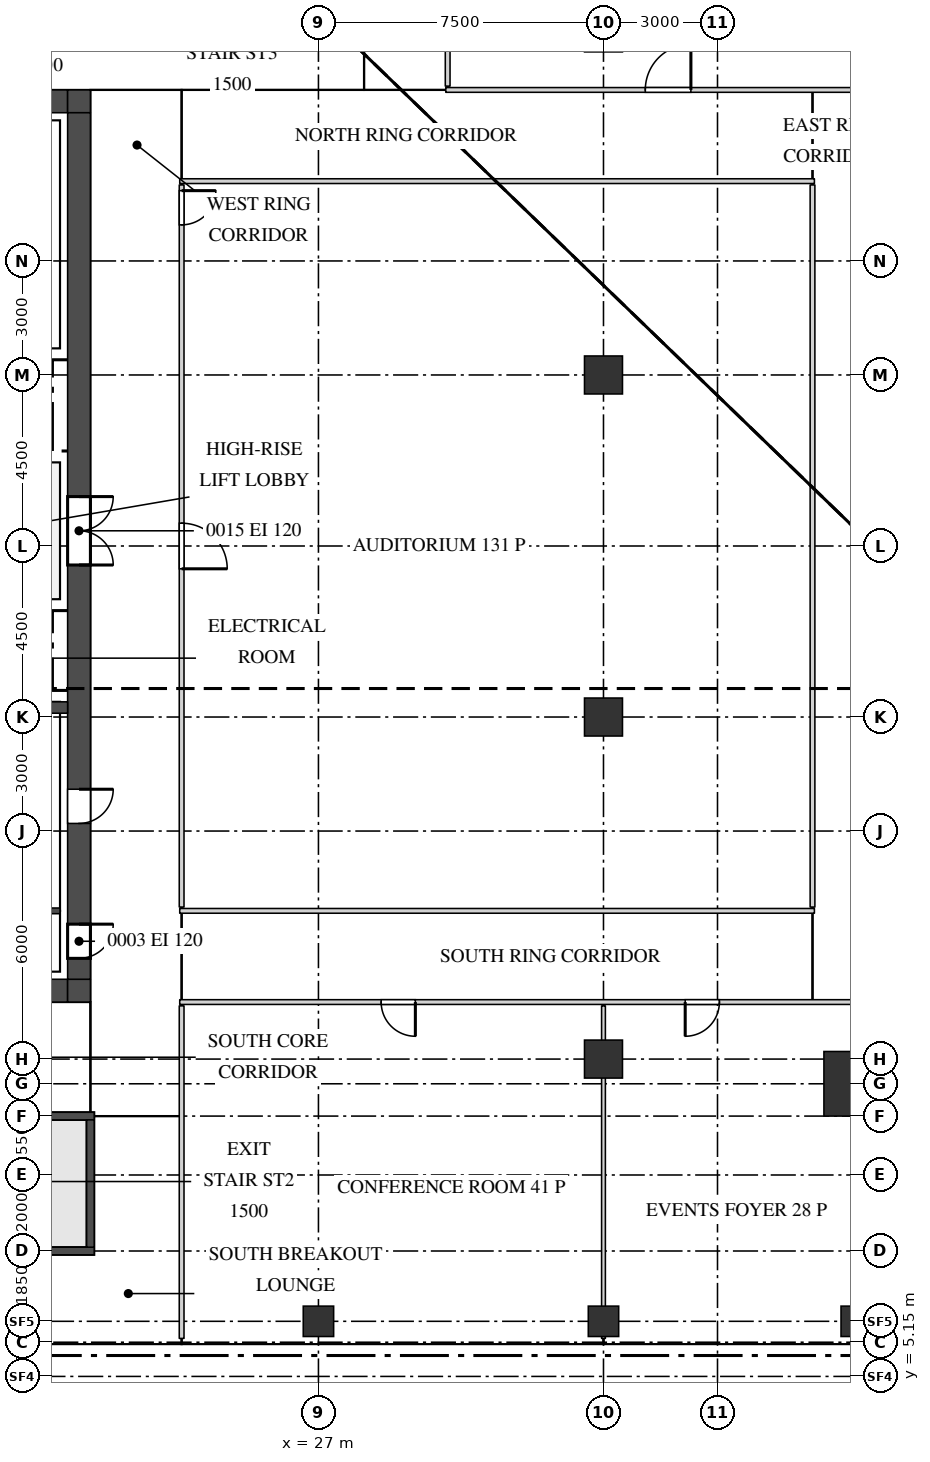
"""IFC4 building model, lengths in metres.
Left out: names, types, materials, properties, quantities, classifications, styles, units other than length and angle.
Written with IfcOpenShell. Run it as: python <this file> out.ifc"""

import sys

from ifc_helpers import new_model, si_unit, direction, frame, frame_2d, origin, origin_2d, place, context, subcontext, project, spatial, rectangle, extrude, source, transform, mapped, element, fill, save


model = new_model("IFC4")
c1 = context("Model", 3, precision=1e-05, world=origin(), true_north=direction((0.0, 1.0)))
c2 = subcontext(c1, "Body", "Model", "MODEL_VIEW")
j1 = project(units=[si_unit("LENGTHUNIT", "METRE"), si_unit("PLANEANGLEUNIT", "RADIAN")], contexts=[c1])
p1 = place(None, origin())
s1 = spatial("IfcSite", under=j1, at=p1, CompositionType="ELEMENT")
p2 = place(p1, origin())
s2 = spatial("IfcBuilding", under=s1, at=p2, CompositionType="ELEMENT")
p3 = place(p2, frame((0.0, 0.0, 318.2)))
s3 = spatial("IfcBuildingStorey", under=s2, at=p3, CompositionType="ELEMENT", Elevation=318.2)
m1 = source(origin(), c2, "Body", "SweptSolid", [
    extrude(rectangle(XDim=14.4, YDim=0.6, at=frame_2d((7.2, 0.0))), origin(), (0.0, 0.0, 1.0), 3.75),
])
p4 = place(p3, frame((6.0, 38.7, 0.0), z_axis=(0.0, 0.0, 1.0), x_axis=(1.0, 0.0, 0.0)))
e1 = element("IfcWall", 1, at=p4, inside=s3, PredefinedType="SHEAR", context=c2, shape_type="MappedRepresentation", body=[
    mapped(m1, transform((0.0, 0.0, 0.0))),
])
m2 = source(origin(), c2, "Body", "SweptSolid", [
    extrude(rectangle(XDim=0.9, YDim=2.1, at=frame_2d((0.45, 1.05))), frame((0.0, 0.31, 0.0), z_axis=(0.0, -1.0, 0.0), x_axis=(1.0, 0.0, 0.0)), (0.0, 0.0, 1.0), 0.62),
])
p5 = place(p4, frame((2.05, 0.0, 0.0)))
e2 = element("IfcOpeningElement", 2, at=p5, cuts=e1, PredefinedType="OPENING", context=c2, shape_type="MappedRepresentation", body=[
    mapped(m2, transform((0.0, 0.0, 0.0))),
])
p6 = place(p4, frame((5.45, 0.0, 0.0)))
e3 = element("IfcOpeningElement", 3, at=p6, cuts=e1, PredefinedType="OPENING", context=c2, shape_type="MappedRepresentation", body=[
    mapped(m2, transform((0.0, 0.0, 0.0))),
])
m3 = source(origin(), c2, "Body", "SweptSolid", [
    extrude(rectangle(XDim=1.0, YDim=2.1, at=frame_2d((0.5, 1.05))), frame((0.0, 0.31, 0.0), z_axis=(0.0, -1.0, 0.0), x_axis=(1.0, 0.0, 0.0)), (0.0, 0.0, 1.0), 0.62),
])
p7 = place(p4, frame((8.8, 0.0, 0.0)))
e4 = element("IfcOpeningElement", 4, at=p7, cuts=e1, PredefinedType="OPENING", context=c2, shape_type="MappedRepresentation", body=[
    mapped(m3, transform((0.0, 0.0, 0.0))),
])
p8 = place(p4, frame((12.15, 0.0, 0.0)))
e5 = element("IfcOpeningElement", 5, at=p8, cuts=e1, PredefinedType="OPENING", context=c2, shape_type="MappedRepresentation", body=[
    mapped(m2, transform((0.0, 0.0, 0.0))),
])
m4 = source(origin(), c2, "Body", "SweptSolid", [
    extrude(rectangle(XDim=0.6, YDim=0.6, at=frame_2d((0.3, 0.0))), origin(), (0.0, 0.0, 1.0), 3.75),
])
p9 = place(p3, frame((20.4, 38.7, 0.0), z_axis=(0.0, 0.0, 1.0), x_axis=(1.0, 0.0, 0.0)))
e6 = element("IfcWall", 6, at=p9, inside=s3, PredefinedType="SHEAR", context=c2, shape_type="MappedRepresentation", body=[
    mapped(m4, transform((0.0, 0.0, 0.0))),
])
p10 = place(p3, frame((6.0, 15.3, 0.0), z_axis=(0.0, 0.0, 1.0), x_axis=(1.0, 0.0, 0.0)))
e7 = element("IfcWall", 7, at=p10, inside=s3, PredefinedType="SHEAR", context=c2, shape_type="MappedRepresentation", body=[
    mapped(m1, transform((0.0, 0.0, 0.0))),
])
m5 = source(origin(), c2, "Body", "SweptSolid", [
    extrude(rectangle(XDim=1.2, YDim=2.1, at=frame_2d((0.6, 1.05))), frame((0.0, 0.31, 0.0), z_axis=(0.0, -1.0, 0.0), x_axis=(1.0, 0.0, 0.0)), (0.0, 0.0, 1.0), 0.62),
])
p11 = place(p10, frame((6.2, 0.0, 0.0)))
e8 = element("IfcOpeningElement", 8, at=p11, cuts=e7, PredefinedType="OPENING", context=c2, shape_type="MappedRepresentation", body=[
    mapped(m5, transform((0.0, 0.0, 0.0))),
])
p12 = place(p10, frame((2.85, 0.0, 0.0)))
e9 = element("IfcOpeningElement", 9, at=p12, cuts=e7, PredefinedType="OPENING", context=c2, shape_type="MappedRepresentation", body=[
    mapped(m5, transform((0.0, 0.0, 0.0))),
])
p13 = place(p10, frame((8.7, 0.0, 0.0)))
e10 = element("IfcOpeningElement", 10, at=p13, cuts=e7, PredefinedType="OPENING", context=c2, shape_type="MappedRepresentation", body=[
    mapped(m3, transform((0.0, 0.0, 0.0))),
])
p14 = place(p3, frame((20.4, 15.3, 0.0), z_axis=(0.0, 0.0, 1.0), x_axis=(1.0, 0.0, 0.0)))
e11 = element("IfcWall", 11, at=p14, inside=s3, PredefinedType="SHEAR", context=c2, shape_type="MappedRepresentation", body=[
    mapped(m4, transform((0.0, 0.0, 0.0))),
])
m6 = source(origin(), c2, "Body", "SweptSolid", [
    extrude(rectangle(XDim=22.8, YDim=0.6, at=frame_2d((11.4, 0.0))), origin(), (0.0, 0.0, 1.0), 3.75),
])
p15 = place(p3, frame((20.7, 15.6, 0.0), z_axis=(0.0, 0.0, 1.0), x_axis=(0.0, 1.0, 0.0)))
e12 = element("IfcWall", 12, at=p15, inside=s3, PredefinedType="SHEAR", context=c2, shape_type="MappedRepresentation", body=[
    mapped(m6, transform((0.0, 0.0, 0.0))),
])
m7 = source(origin(), c2, "Body", "SweptSolid", [
    extrude(rectangle(XDim=1.8, YDim=2.1, at=frame_2d((0.9, 1.05))), frame((0.0, 0.31, 0.0), z_axis=(0.0, -1.0, 0.0), x_axis=(1.0, 0.0, 0.0)), (0.0, 0.0, 1.0), 0.62),
])
p16 = place(p15, frame((10.9, 0.0, 0.0)))
e13 = element("IfcOpeningElement", 13, at=p16, cuts=e12, PredefinedType="OPENING", context=c2, shape_type="MappedRepresentation", body=[
    mapped(m7, transform((0.0, 0.0, 0.0))),
])
p17 = place(p15, frame((0.55, 0.0, 0.0)))
e14 = element("IfcOpeningElement", 14, at=p17, cuts=e12, PredefinedType="OPENING", context=c2, shape_type="MappedRepresentation", body=[
    mapped(m2, transform((0.0, 0.0, 0.0))),
])
p18 = place(p15, frame((4.1, 0.0, 0.0)))
e15 = element("IfcOpeningElement", 15, at=p18, cuts=e12, PredefinedType="OPENING", context=c2, shape_type="MappedRepresentation", body=[
    mapped(m2, transform((0.0, 0.0, 0.0))),
])
m8 = source(origin(), c2, "Body", "SweptSolid", [
    extrude(rectangle(XDim=7.2, YDim=0.2, at=frame_2d((3.6, 0.0))), origin(), (0.0, 0.0, 1.0), 3.75),
])
p19 = place(p3, frame((13.9, 12.0, 0.0), z_axis=(0.0, 0.0, 1.0), x_axis=(1.0, 0.0, 0.0)))
e16 = element("IfcWall", 16, at=p19, inside=s3, PredefinedType="SHEAR", context=c2, shape_type="MappedRepresentation", body=[
    mapped(m8, transform((0.0, 0.0, 0.0))),
])
p20 = place(p3, frame((13.9, 8.45, 0.0), z_axis=(0.0, 0.0, 1.0), x_axis=(1.0, 0.0, 0.0)))
e17 = element("IfcWall", 17, at=p20, inside=s3, PredefinedType="SHEAR", context=c2, shape_type="MappedRepresentation", body=[
    mapped(m8, transform((0.0, 0.0, 0.0))),
])
m9 = source(origin(), c2, "Body", "SweptSolid", [
    extrude(rectangle(XDim=1.2, YDim=2.1, at=frame_2d((0.6, 1.05))), frame((0.0, 0.11, 0.0), z_axis=(0.0, -1.0, 0.0), x_axis=(1.0, 0.0, 0.0)), (0.0, 0.0, 1.0), 0.22),
])
p21 = place(p20, frame((0.35, 0.0, 0.0)))
e18 = element("IfcOpeningElement", 18, at=p21, cuts=e17, PredefinedType="OPENING", context=c2, shape_type="MappedRepresentation", body=[
    mapped(m9, transform((0.0, 0.0, 0.0))),
])
m10 = source(origin(), c2, "Body", "SweptSolid", [
    extrude(rectangle(XDim=3.35, YDim=0.2, at=frame_2d((1.675, 0.0))), origin(), (0.0, 0.0, 1.0), 3.75),
])
p22 = place(p3, frame((21.0, 8.55, 0.0), z_axis=(0.0, 0.0, 1.0), x_axis=(0.0, 1.0, 0.0)))
e19 = element("IfcWall", 19, at=p22, inside=s3, PredefinedType="SHEAR", context=c2, shape_type="MappedRepresentation", body=[
    mapped(m10, transform((0.0, 0.0, 0.0))),
])
m11 = source(origin(), c2, "Body", "SweptSolid", [
    extrude(rectangle(XDim=13.2, YDim=0.3, at=frame_2d((6.6, 0.0))), origin(), (0.0, 0.0, 1.0), 3.75),
])
p23 = place(p3, frame((7.2, 22.75, 0.0), z_axis=(0.0, 0.0, 1.0), x_axis=(1.0, 0.0, 0.0)))
e20 = element("IfcWall", 20, at=p23, inside=s3, PredefinedType="STANDARD", context=c2, shape_type="MappedRepresentation", body=[
    mapped(m11, transform((0.0, 0.0, 0.0))),
])
m12 = source(origin(), c2, "Body", "SweptSolid", [
    extrude(rectangle(XDim=1.7, YDim=1.7, at=origin_2d()), origin(), (0.0, 0.0, 1.0), 3.75),
])
p24 = place(p3, frame((41.15, 12.85, 0.0), z_axis=(0.0, 0.0, 1.0), x_axis=(1.0, 0.0, 0.0)))
e21 = element("IfcColumn", 21, at=p24, inside=s3, PredefinedType="COLUMN", context=c2, shape_type="MappedRepresentation", body=[
    mapped(m12, transform((0.0, 0.0, 0.0))),
])
m13 = source(origin(), c2, "Body", "SweptSolid", [
    extrude(rectangle(XDim=0.8, YDim=0.8, at=origin_2d()), origin(), (0.0, 0.0, 1.0), 3.75),
])
for number, where, z_axis, x_axis in (
    (22, (27.0, 6.6, 0.0), (0.0, 0.0, 1.0), (1.0, 0.0, 0.0)),
    (23, (34.5, 6.6, 0.0), (0.0, 0.0, 1.0), (1.0, 0.0, 0.0)),
    (24, (41.15, 6.6, 0.0), (0.0, 0.0, 1.0), (1.0, 0.0, 0.0)),
):
    element("IfcColumn", number, at=place(p3, frame(where, z_axis=z_axis, x_axis=x_axis)), inside=s3, PredefinedType="COLUMN", context=c2, shape_type="MappedRepresentation", body=[
        mapped(m13, transform((0.0, 0.0, 0.0))),
    ])
m14 = source(origin(), c2, "Body", "SweptSolid", [
    extrude(rectangle(XDim=1.0, YDim=1.0, at=origin_2d()), origin(), (0.0, 0.0, 1.0), 3.75),
])
for number, where, z_axis, x_axis in (
    (25, (34.5, 13.5, 0.0), (0.0, 0.0, 1.0), (1.0, 0.0, 0.0)),
    (26, (34.5, 22.5, 0.0), (0.0, 0.0, 1.0), (1.0, 0.0, 0.0)),
    (27, (34.5, 31.5, 0.0), (0.0, 0.0, 1.0), (1.0, 0.0, 0.0)),
):
    element("IfcColumn", number, at=place(p3, frame(where, z_axis=z_axis, x_axis=x_axis)), inside=s3, PredefinedType="COLUMN", context=c2, shape_type="MappedRepresentation", body=[
        mapped(m14, transform((0.0, 0.0, 0.0))),
    ])
m15 = source(origin(), c2, "Body", "SweptSolid", [
    extrude(rectangle(XDim=8.75, YDim=0.125, at=frame_2d((4.375, 0.0))), origin(), (0.0, 0.0, 1.0), 3.8),
])
p25 = place(p3, frame((23.4, 6.15, 0.0), z_axis=(0.0, 0.0, 1.0), x_axis=(0.0, 1.0, 0.0)))
e28 = element("IfcWall", 28, at=p25, inside=s3, PredefinedType="PARTITIONING", context=c2, shape_type="MappedRepresentation", body=[
    mapped(m15, transform((0.0, 0.0, 0.0))),
])
m16 = source(origin(), c2, "Body", "SweptSolid", [
    extrude(rectangle(XDim=8.75, YDim=0.1, at=frame_2d((4.375, 0.0))), origin(), (0.0, 0.0, 1.0), 3.35),
])
p26 = place(p3, frame((34.5, 6.15, 0.0), z_axis=(0.0, 0.0, 1.0), x_axis=(0.0, 1.0, 0.0)))
e29 = element("IfcWall", 29, at=p26, inside=s3, PredefinedType="PARTITIONING", context=c2, shape_type="MappedRepresentation", body=[
    mapped(m16, transform((0.0, 0.0, 0.0))),
])
m17 = source(origin(), c2, "Body", "SweptSolid", [
    extrude(rectangle(XDim=19.1, YDim=0.125, at=frame_2d((9.55, 0.0))), origin(), (0.0, 0.0, 1.0), 3.8),
])
p27 = place(p3, frame((23.35, 15.0, 0.0), z_axis=(0.0, 0.0, 1.0), x_axis=(1.0, 0.0, 0.0)))
e30 = element("IfcWall", 30, at=p27, inside=s3, PredefinedType="PARTITIONING", context=c2, shape_type="MappedRepresentation", body=[
    mapped(m17, transform((0.0, 0.0, 0.0))),
])
m18 = source(origin(), c2, "Body", "SweptSolid", [
    extrude(rectangle(XDim=0.9, YDim=2.1, at=frame_2d((0.45, 1.05))), frame((0.0, 0.073, 0.0), z_axis=(0.0, -1.0, 0.0), x_axis=(1.0, 0.0, 0.0)), (0.0, 0.0, 1.0), 0.145),
])
p28 = place(p27, frame((5.3, 0.0, 0.0)))
e31 = element("IfcOpeningElement", 31, at=p28, cuts=e30, PredefinedType="OPENING", context=c2, shape_type="MappedRepresentation", body=[
    mapped(m18, transform((0.0, 0.0, 0.0))),
])
p29 = place(p27, frame((13.3, 0.0, 0.0)))
e32 = element("IfcOpeningElement", 32, at=p29, cuts=e30, PredefinedType="OPENING", context=c2, shape_type="MappedRepresentation", body=[
    mapped(m18, transform((0.0, 0.0, 0.0))),
])
m19 = source(origin(), c2, "Body", "SweptSolid", [
    extrude(rectangle(XDim=4.0, YDim=0.15, at=frame_2d((2.0, 0.0))), origin(), (0.0, 0.0, 1.0), 3.8),
])
p30 = place(p3, frame((16.2, 17.4, 0.0), z_axis=(0.0, 0.0, 1.0), x_axis=(1.0, 0.0, 0.0)))
e33 = element("IfcWall", 33, at=p30, inside=s3, PredefinedType="PARTITIONING", context=c2, shape_type="MappedRepresentation", body=[
    mapped(m19, transform((0.0, 0.0, 0.0))),
])
m20 = source(origin(), c2, "Body", "SweptSolid", [
    extrude(rectangle(XDim=16.7, YDim=0.125, at=frame_2d((8.35, 0.0))), origin(), (0.0, 0.0, 1.0), 3.8),
])
p31 = place(p3, frame((23.35, 17.4, 0.0), z_axis=(0.0, 0.0, 1.0), x_axis=(1.0, 0.0, 0.0)))
e34 = element("IfcWall", 34, at=p31, inside=s3, PredefinedType="PARTITIONING", context=c2, shape_type="MappedRepresentation", body=[
    mapped(m20, transform((0.0, 0.0, 0.0))),
])
m21 = source(origin(), c2, "Body", "SweptSolid", [
    extrude(rectangle(XDim=19.0, YDim=0.125, at=frame_2d((9.5, 0.0))), origin(), (0.0, 0.0, 1.0), 3.8),
])
p32 = place(p3, frame((23.4, 17.5, 0.0), z_axis=(0.0, 0.0, 1.0), x_axis=(0.0, 1.0, 0.0)))
e35 = element("IfcWall", 35, at=p32, inside=s3, PredefinedType="PARTITIONING", context=c2, shape_type="MappedRepresentation", body=[
    mapped(m21, transform((0.0, 0.0, 0.0))),
])
m22 = source(origin(), c2, "Body", "SweptSolid", [
    extrude(rectangle(XDim=1.2, YDim=2.1, at=frame_2d((0.6, 1.05))), frame((0.0, 0.073, 0.0), z_axis=(0.0, -1.0, 0.0), x_axis=(1.0, 0.0, 0.0)), (0.0, 0.0, 1.0), 0.145),
])
p33 = place(p32, frame((8.9, 0.0, 0.0)))
e36 = element("IfcOpeningElement", 36, at=p33, cuts=e35, PredefinedType="OPENING", context=c2, shape_type="MappedRepresentation", body=[
    mapped(m22, transform((0.0, 0.0, 0.0))),
])
p34 = place(p32, frame((17.95, 0.0, 0.0)))
e37 = element("IfcOpeningElement", 37, at=p34, cuts=e35, PredefinedType="OPENING", context=c2, shape_type="MappedRepresentation", body=[
    mapped(m18, transform((0.0, 0.0, 0.0))),
])
p35 = place(p3, frame((40.0, 17.5, 0.0), z_axis=(0.0, 0.0, 1.0), x_axis=(0.0, 1.0, 0.0)))
e38 = element("IfcWall", 38, at=p35, inside=s3, PredefinedType="PARTITIONING", context=c2, shape_type="MappedRepresentation", body=[
    mapped(m21, transform((0.0, 0.0, 0.0))),
])
p36 = place(p3, frame((23.35, 36.6, 0.0), z_axis=(0.0, 0.0, 1.0), x_axis=(1.0, 0.0, 0.0)))
e39 = element("IfcWall", 39, at=p36, inside=s3, PredefinedType="PARTITIONING", context=c2, shape_type="MappedRepresentation", body=[
    mapped(m20, transform((0.0, 0.0, 0.0))),
])
m23 = source(origin(), c2, "Body", "SweptSolid", [
    extrude(rectangle(XDim=12.1, YDim=0.125, at=frame_2d((6.05, 0.0))), origin(), (0.0, 0.0, 1.0), 3.8),
])
p37 = place(p3, frame((30.35, 39.0, 0.0), z_axis=(0.0, 0.0, 1.0), x_axis=(1.0, 0.0, 0.0)))
e40 = element("IfcWall", 40, at=p37, inside=s3, PredefinedType="PARTITIONING", context=c2, shape_type="MappedRepresentation", body=[
    mapped(m23, transform((0.0, 0.0, 0.0))),
])
p38 = place(p37, frame((5.25, 0.0, 0.0)))
e41 = element("IfcOpeningElement", 41, at=p38, cuts=e40, PredefinedType="OPENING", context=c2, shape_type="MappedRepresentation", body=[
    mapped(m22, transform((0.0, 0.0, 0.0))),
])
p39 = place(p3, frame((30.4, 39.1, 0.0), z_axis=(0.0, 0.0, 1.0), x_axis=(0.0, 1.0, 0.0)))
e42 = element("IfcWall", 42, at=p39, inside=s3, PredefinedType="PARTITIONING", context=c2, shape_type="MappedRepresentation", body=[
    mapped(m15, transform((0.0, 0.0, 0.0))),
])
m24 = source(origin(), c2, "Body", "SweptSolid", [
    extrude(rectangle(XDim=1.8, YDim=2.1, at=frame_2d((0.9, 1.05))), frame((0.0, 0.25, 0.0), z_axis=(0.0, -1.0, 0.0), x_axis=(1.0, 0.0, 0.0)), (0.0, 0.0, 1.0), 0.5),
])
p40 = place(p16, origin())
e43 = element("IfcDoor", 43, at=p40, inside=s3, OperationType="DOUBLE_DOOR_SINGLE_SWING", PredefinedType="DOOR", context=c2, shape_type="MappedRepresentation", body=[
    mapped(m24, transform((0.0, 0.0, 0.0))),
])
fill(e13, e43)
m25 = source(origin(), c2, "Body", "SweptSolid", [
    extrude(rectangle(XDim=0.9, YDim=2.1, at=frame_2d((0.45, 1.05))), frame((0.0, 0.25, 0.0), z_axis=(0.0, -1.0, 0.0), x_axis=(1.0, 0.0, 0.0)), (0.0, 0.0, 1.0), 0.5),
])
p41 = place(p17, origin())
e44 = element("IfcDoor", 44, at=p41, inside=s3, OperationType="SINGLE_SWING_RIGHT", PredefinedType="DOOR", context=c2, shape_type="MappedRepresentation", body=[
    mapped(m25, transform((0.0, 0.0, 0.0))),
])
fill(e14, e44)
p42 = place(p18, origin())
e45 = element("IfcDoor", 45, at=p42, inside=s3, OperationType="SINGLE_SWING_RIGHT", PredefinedType="DOOR", context=c2, shape_type="MappedRepresentation", body=[
    mapped(m25, transform((0.0, 0.0, 0.0))),
])
fill(e15, e45)
m26 = source(origin(), c2, "Body", "SweptSolid", [
    extrude(rectangle(XDim=0.9, YDim=2.1, at=frame_2d((0.45, 1.05))), frame((0.0, 0.025, 0.0), z_axis=(0.0, -1.0, 0.0), x_axis=(1.0, 0.0, 0.0)), (0.0, 0.0, 1.0), 0.05),
])
p43 = place(p28, origin())
e46 = element("IfcDoor", 46, at=p43, inside=s3, OperationType="SINGLE_SWING_RIGHT", PredefinedType="DOOR", context=c2, shape_type="MappedRepresentation", body=[
    mapped(m26, transform((0.0, 0.0, 0.0))),
])
fill(e31, e46)
p44 = place(p29, origin())
e47 = element("IfcDoor", 47, at=p44, inside=s3, OperationType="SINGLE_SWING_LEFT", PredefinedType="DOOR", context=c2, shape_type="MappedRepresentation", body=[
    mapped(m26, transform((0.0, 0.0, 0.0))),
])
fill(e32, e47)
m27 = source(origin(), c2, "Body", "SweptSolid", [
    extrude(rectangle(XDim=1.2, YDim=2.1, at=frame_2d((0.6, 1.05))), frame((0.0, 0.025, 0.0), z_axis=(0.0, -1.0, 0.0), x_axis=(1.0, 0.0, 0.0)), (0.0, 0.0, 1.0), 0.05),
])
p45 = place(p38, origin())
e48 = element("IfcDoor", 48, at=p45, inside=s3, OperationType="SINGLE_SWING_LEFT", PredefinedType="DOOR", context=c2, shape_type="MappedRepresentation", body=[
    mapped(m27, transform((0.0, 0.0, 0.0))),
])
fill(e41, e48)
p46 = place(p33, origin())
e49 = element("IfcDoor", 49, at=p46, inside=s3, OperationType="SINGLE_SWING_LEFT", PredefinedType="DOOR", context=c2, shape_type="MappedRepresentation", body=[
    mapped(m27, transform((0.0, 0.0, 0.0))),
])
fill(e36, e49)
p47 = place(p34, origin())
e50 = element("IfcDoor", 50, at=p47, inside=s3, OperationType="SINGLE_SWING_RIGHT", PredefinedType="DOOR", context=c2, shape_type="MappedRepresentation", body=[
    mapped(m26, transform((0.0, 0.0, 0.0))),
])
fill(e37, e50)
save(model, sys.argv[1])
